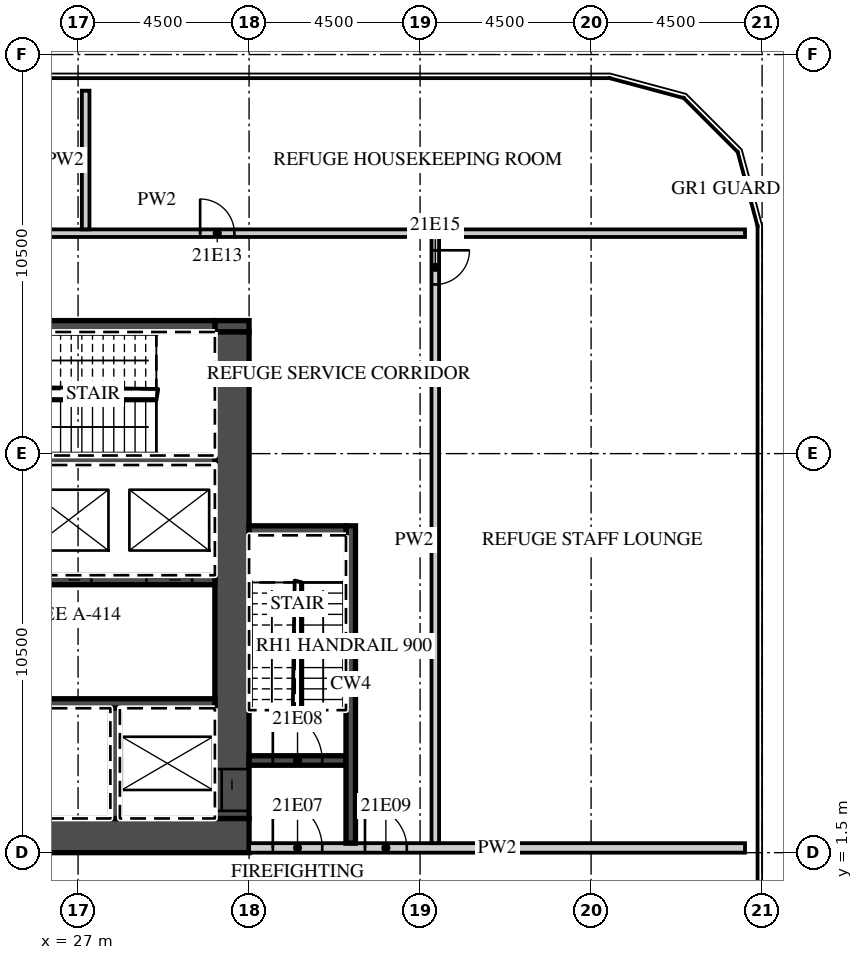
"""IFC4 building model, lengths in metres.
Left out: names, types, materials, properties, quantities, classifications, styles, units other than length and angle.
Written with IfcOpenShell. Run it as: python <this file> out.ifc"""

import sys

from ifc_helpers import new_model, si_unit, direction, frame, frame_2d, origin, place, context, subcontext, project, spatial, rectangle, extrude, element, fill, save


model = new_model("IFC4")
c1 = context("Model", 3, precision=1e-05, world=origin(), true_north=direction((0.0, 1.0)))
c2 = subcontext(c1, "Body", "Model", "MODEL_VIEW")
j1 = project(units=[si_unit("LENGTHUNIT", "METRE"), si_unit("PLANEANGLEUNIT", "RADIAN")], contexts=[c1])
p1 = place(None, origin())
s1 = spatial("IfcSite", under=j1, at=p1, CompositionType="ELEMENT")
p2 = place(p1, origin())
s2 = spatial("IfcBuilding", under=s1, at=p2, CompositionType="ELEMENT")
p3 = place(p2, frame((0.0, 0.0, 99.6)))
s3 = spatial("IfcBuildingStorey", under=s2, at=p3, CompositionType="ELEMENT", Elevation=99.6)
p4 = place(p3, frame((13.5, 1.95, 0.0), z_axis=(0.0, 0.0, 1.0), x_axis=(1.0, 0.0, 0.0)))
e1 = element("IfcWall", 1, at=p4, inside=s3, PredefinedType="SHEAR", context=c2, shape_type="SweptSolid", body=[
    extrude(rectangle(XDim=18.0, YDim=0.9, at=frame_2d((9.0, 0.0))), origin(), (0.0, 0.0, 1.0), 4.2),
])
p5 = place(p4, frame((1.475, 0.0, 0.0)))
e2 = element("IfcOpeningElement", 2, at=p5, cuts=e1, PredefinedType="OPENING", context=c2, shape_type="SweptSolid", body=[
    extrude(rectangle(XDim=1.8, YDim=2.1, at=frame_2d((0.9, 1.05))), frame((0.0, 0.46, 0.0), z_axis=(0.0, -1.0, 0.0), x_axis=(1.0, 0.0, 0.0)), (0.0, 0.0, 1.0), 0.92),
])
p6 = place(p3, frame((30.6, 15.35, 0.0), z_axis=(0.0, 0.0, 1.0), x_axis=(1.0, 0.0, 0.0)))
e3 = element("IfcWall", 3, at=p6, inside=s3, PredefinedType="SHEAR", context=c2, shape_type="SweptSolid", body=[
    extrude(rectangle(XDim=0.9, YDim=0.3, at=frame_2d((0.45, 0.0))), origin(), (0.0, 0.0, 1.0), 4.2),
])
p7 = place(p3, frame((20.3, 15.35, 0.0), z_axis=(0.0, 0.0, 1.0), x_axis=(1.0, 0.0, 0.0)))
e4 = element("IfcWall", 4, at=p7, inside=s3, PredefinedType="SHEAR", context=c2, shape_type="SweptSolid", body=[
    extrude(rectangle(XDim=10.3, YDim=0.3, at=frame_2d((5.15, 0.0))), origin(), (0.0, 0.0, 1.0), 4.2),
])
p8 = place(p7, frame((4.0, 0.0, 0.0)))
e5 = element("IfcOpeningElement", 5, at=p8, cuts=e4, PredefinedType="OPENING", context=c2, shape_type="SweptSolid", body=[
    extrude(rectangle(XDim=1.3, YDim=2.1, at=frame_2d((0.65, 1.05))), frame((0.0, 0.16, 0.0), z_axis=(0.0, -1.0, 0.0), x_axis=(1.0, 0.0, 0.0)), (0.0, 0.0, 1.0), 0.32),
])
p9 = place(p7, frame((1.5, 0.0, 0.0)))
e6 = element("IfcOpeningElement", 6, at=p9, cuts=e4, PredefinedType="OPENING", context=c2, shape_type="SweptSolid", body=[
    extrude(rectangle(XDim=0.9, YDim=2.1, at=frame_2d((0.45, 1.05))), frame((0.0, 0.16, 0.0), z_axis=(0.0, -1.0, 0.0), x_axis=(1.0, 0.0, 0.0)), (0.0, 0.0, 1.0), 0.32),
])
p10 = place(p3, frame((31.05, 2.4, 0.0), z_axis=(0.0, 0.0, 1.0), x_axis=(0.0, 1.0, 0.0)))
e7 = element("IfcWall", 7, at=p10, inside=s3, PredefinedType="SHEAR", context=c2, shape_type="SweptSolid", body=[
    extrude(rectangle(XDim=12.8, YDim=0.9, at=frame_2d((6.4, 0.0))), origin(), (0.0, 0.0, 1.0), 4.2),
])
p11 = place(p10, frame((0.2, 0.0, 0.0)))
e8 = element("IfcOpeningElement", 8, at=p11, cuts=e7, PredefinedType="OPENING", context=c2, shape_type="SweptSolid", body=[
    extrude(rectangle(XDim=1.1, YDim=2.1, at=frame_2d((0.55, 1.05))), frame((0.0, 0.46, 0.0), z_axis=(0.0, -1.0, 0.0), x_axis=(1.0, 0.0, 0.0)), (0.0, 0.0, 1.0), 0.92),
])
p12 = place(p3, frame((17.6, 5.425, 0.0), z_axis=(0.0, 0.0, 1.0), x_axis=(1.0, 0.0, 0.0)))
e9 = element("IfcWall", 9, at=p12, inside=s3, PredefinedType="SHEAR", context=c2, shape_type="SweptSolid", body=[
    extrude(rectangle(XDim=13.0, YDim=0.25, at=frame_2d((6.5, 0.0))), origin(), (0.0, 0.0, 1.0), 4.2),
])
p13 = place(p3, frame((27.975, 2.4, 0.0), z_axis=(0.0, 0.0, 1.0), x_axis=(0.0, 1.0, 0.0)))
e10 = element("IfcWall", 10, at=p13, inside=s3, PredefinedType="SHEAR", context=c2, shape_type="SweptSolid", body=[
    extrude(rectangle(XDim=2.9, YDim=0.25, at=frame_2d((1.45, 0.0))), origin(), (0.0, 0.0, 1.0), 4.2),
])
p14 = place(p3, frame((14.4, 8.675, 0.0), z_axis=(0.0, 0.0, 1.0), x_axis=(1.0, 0.0, 0.0)))
e11 = element("IfcWall", 11, at=p14, inside=s3, PredefinedType="SHEAR", context=c2, shape_type="SweptSolid", body=[
    extrude(rectangle(XDim=16.2, YDim=0.25, at=frame_2d((8.1, 0.0))), origin(), (0.0, 0.0, 1.0), 4.2),
])
p15 = place(p14, frame((14.4, 0.0, 0.0)))
e12 = element("IfcOpeningElement", 12, at=p15, cuts=e11, PredefinedType="OPENING", context=c2, shape_type="SweptSolid", body=[
    extrude(rectangle(XDim=1.2, YDim=2.1, at=frame_2d((0.6, 1.05))), frame((0.0, 0.135, 0.0), z_axis=(0.0, -1.0, 0.0), x_axis=(1.0, 0.0, 0.0)), (0.0, 0.0, 1.0), 0.27),
])
p16 = place(p14, frame((11.75, 0.0, 0.0)))
e13 = element("IfcOpeningElement", 13, at=p16, cuts=e11, PredefinedType="OPENING", context=c2, shape_type="SweptSolid", body=[
    extrude(rectangle(XDim=1.2, YDim=2.1, at=frame_2d((0.6, 1.05))), frame((0.0, 0.135, 0.0), z_axis=(0.0, -1.0, 0.0), x_axis=(1.0, 0.0, 0.0)), (0.0, 0.0, 1.0), 0.27),
])
p17 = place(p14, frame((9.1, 0.0, 0.0)))
e14 = element("IfcOpeningElement", 14, at=p17, cuts=e11, PredefinedType="OPENING", context=c2, shape_type="SweptSolid", body=[
    extrude(rectangle(XDim=1.2, YDim=2.1, at=frame_2d((0.6, 1.05))), frame((0.0, 0.135, 0.0), z_axis=(0.0, -1.0, 0.0), x_axis=(1.0, 0.0, 0.0)), (0.0, 0.0, 1.0), 0.27),
])
p18 = place(p14, frame((0.65, 0.0, 0.0)))
e15 = element("IfcOpeningElement", 15, at=p18, cuts=e11, PredefinedType="OPENING", context=c2, shape_type="SweptSolid", body=[
    extrude(rectangle(XDim=1.3, YDim=2.1, at=frame_2d((0.65, 1.05))), frame((0.0, 0.135, 0.0), z_axis=(0.0, -1.0, 0.0), x_axis=(1.0, 0.0, 0.0)), (0.0, 0.0, 1.0), 0.27),
])
p19 = place(p3, frame((17.35, 11.825, 0.0), z_axis=(0.0, 0.0, 1.0), x_axis=(1.0, 0.0, 0.0)))
e16 = element("IfcWall", 16, at=p19, inside=s3, PredefinedType="SHEAR", context=c2, shape_type="SweptSolid", body=[
    extrude(rectangle(XDim=13.25, YDim=0.25, at=frame_2d((6.625, 0.0))), origin(), (0.0, 0.0, 1.0), 4.2),
])
p20 = place(p3, frame((31.5, 1.625, 0.0), z_axis=(0.0, 0.0, 1.0), x_axis=(1.0, 0.0, 0.0)))
e17 = element("IfcWall", 17, at=p20, inside=s3, PredefinedType="PARTITIONING", context=c2, shape_type="SweptSolid", body=[
    extrude(rectangle(XDim=13.05, YDim=0.25, at=frame_2d((6.525, 0.0))), origin(), (0.0, 0.0, 1.0), 4.2),
])
p21 = place(p20, frame((0.625, 0.0, 0.0)))
e18 = element("IfcOpeningElement", 18, at=p21, cuts=e17, PredefinedType="OPENING", context=c2, shape_type="SweptSolid", body=[
    extrude(rectangle(XDim=1.3, YDim=2.1, at=frame_2d((0.65, 1.05))), frame((0.0, 0.135, 0.0), z_axis=(0.0, -1.0, 0.0), x_axis=(1.0, 0.0, 0.0)), (0.0, 0.0, 1.0), 0.27),
])
p22 = place(p20, frame((3.05, 0.0, 0.0)))
e19 = element("IfcOpeningElement", 19, at=p22, cuts=e17, PredefinedType="OPENING", context=c2, shape_type="SweptSolid", body=[
    extrude(rectangle(XDim=1.1, YDim=2.1, at=frame_2d((0.55, 1.05))), frame((0.0, 0.135, 0.0), z_axis=(0.0, -1.0, 0.0), x_axis=(1.0, 0.0, 0.0)), (0.0, 0.0, 1.0), 0.27),
])
p23 = place(p3, frame((31.5, 3.925, 0.0), z_axis=(0.0, 0.0, 1.0), x_axis=(1.0, 0.0, 0.0)))
e20 = element("IfcWall", 20, at=p23, inside=s3, PredefinedType="SHEAR", context=c2, shape_type="SweptSolid", body=[
    extrude(rectangle(XDim=2.55, YDim=0.25, at=frame_2d((1.275, 0.0))), origin(), (0.0, 0.0, 1.0), 4.2),
])
p24 = place(p23, frame((0.625, 0.0, 0.0)))
e21 = element("IfcOpeningElement", 21, at=p24, cuts=e20, PredefinedType="OPENING", context=c2, shape_type="SweptSolid", body=[
    extrude(rectangle(XDim=1.3, YDim=2.1, at=frame_2d((0.65, 1.05))), frame((0.0, 0.135, 0.0), z_axis=(0.0, -1.0, 0.0), x_axis=(1.0, 0.0, 0.0)), (0.0, 0.0, 1.0), 0.27),
])
p25 = place(p3, frame((34.175, 1.75, 0.0), z_axis=(0.0, 0.0, 1.0), x_axis=(0.0, 1.0, 0.0)))
e22 = element("IfcWall", 22, at=p25, inside=s3, PredefinedType="SHEAR", context=c2, shape_type="SweptSolid", body=[
    extrude(rectangle(XDim=8.35, YDim=0.25, at=frame_2d((4.175, 0.0))), origin(), (0.0, 0.0, 1.0), 4.2),
])
p26 = place(p3, frame((31.5, 9.975, 0.0), z_axis=(0.0, 0.0, 1.0), x_axis=(1.0, 0.0, 0.0)))
e23 = element("IfcWall", 23, at=p26, inside=s3, PredefinedType="SHEAR", context=c2, shape_type="SweptSolid", body=[
    extrude(rectangle(XDim=2.55, YDim=0.25, at=frame_2d((1.275, 0.0))), origin(), (0.0, 0.0, 1.0), 4.2),
])
p27 = place(p3, frame((36.4, 1.75, 0.0), z_axis=(0.0, 0.0, 1.0), x_axis=(0.0, 1.0, 0.0)))
e24 = element("IfcWall", 24, at=p27, inside=s3, PredefinedType="PARTITIONING", context=c2, shape_type="SweptSolid", body=[
    extrude(rectangle(XDim=15.95, YDim=0.2, at=frame_2d((7.975, 0.0))), origin(), (0.0, 0.0, 1.0), 4.2),
])
p28 = place(p27, frame((14.7, 0.0, 0.0)))
e25 = element("IfcOpeningElement", 25, at=p28, cuts=e24, PredefinedType="OPENING", context=c2, shape_type="SweptSolid", body=[
    extrude(rectangle(XDim=0.9, YDim=2.1, at=frame_2d((0.45, 1.05))), frame((0.0, 0.11, 0.0), z_axis=(0.0, -1.0, 0.0), x_axis=(1.0, 0.0, 0.0)), (0.0, 0.0, 1.0), 0.22),
])
p29 = place(p3, frame((13.6, 17.8, 0.0), z_axis=(0.0, 0.0, 1.0), x_axis=(1.0, 0.0, 0.0)))
e26 = element("IfcWall", 26, at=p29, inside=s3, PredefinedType="PARTITIONING", context=c2, shape_type="SweptSolid", body=[
    extrude(rectangle(XDim=30.95, YDim=0.2, at=frame_2d((15.475, 0.0))), origin(), (0.0, 0.0, 1.0), 4.2),
])
p30 = place(p29, frame((16.613, 0.0, 0.0)))
e27 = element("IfcOpeningElement", 27, at=p30, cuts=e26, PredefinedType="OPENING", context=c2, shape_type="SweptSolid", body=[
    extrude(rectangle(XDim=0.9, YDim=2.1, at=frame_2d((0.45, 1.05))), frame((0.0, 0.11, 0.0), z_axis=(0.0, -1.0, 0.0), x_axis=(1.0, 0.0, 0.0)), (0.0, 0.0, 1.0), 0.22),
])
p31 = place(p29, frame((8.312, 0.0, 0.0)))
e28 = element("IfcOpeningElement", 28, at=p31, cuts=e26, PredefinedType="OPENING", context=c2, shape_type="SweptSolid", body=[
    extrude(rectangle(XDim=0.9, YDim=2.1, at=frame_2d((0.45, 1.05))), frame((0.0, 0.11, 0.0), z_axis=(0.0, -1.0, 0.0), x_axis=(1.0, 0.0, 0.0)), (0.0, 0.0, 1.0), 0.22),
])
p32 = place(p3, frame((27.2, 17.9, 0.0), z_axis=(0.0, 0.0, 1.0), x_axis=(0.0, 1.0, 0.0)))
e29 = element("IfcWall", 29, at=p32, inside=s3, PredefinedType="PARTITIONING", context=c2, shape_type="SweptSolid", body=[
    extrude(rectangle(XDim=3.65, YDim=0.2, at=frame_2d((1.825, 0.0))), origin(), (0.0, 0.0, 1.0), 4.2),
])
p33 = place(p15, origin())
e30 = element("IfcDoor", 30, at=p33, inside=s3, OperationType="SLIDING_TO_LEFT", PredefinedType="DOOR", context=c2, shape_type="SweptSolid", body=[
    extrude(rectangle(XDim=1.2, YDim=2.1, at=frame_2d((0.6, 1.05))), frame((0.0, 0.025, 0.0), z_axis=(0.0, -1.0, 0.0), x_axis=(1.0, 0.0, 0.0)), (0.0, 0.0, 1.0), 0.05),
])
fill(e12, e30)
p34 = place(p16, origin())
e31 = element("IfcDoor", 31, at=p34, inside=s3, OperationType="SLIDING_TO_RIGHT", PredefinedType="DOOR", context=c2, shape_type="SweptSolid", body=[
    extrude(rectangle(XDim=1.2, YDim=2.1, at=frame_2d((0.6, 1.05))), frame((0.0, 0.025, 0.0), z_axis=(0.0, -1.0, 0.0), x_axis=(1.0, 0.0, 0.0)), (0.0, 0.0, 1.0), 0.05),
])
fill(e13, e31)
p35 = place(p11, origin())
e32 = element("IfcDoor", 32, at=p35, inside=s3, OperationType="SLIDING_TO_LEFT", PredefinedType="DOOR", context=c2, shape_type="SweptSolid", body=[
    extrude(rectangle(XDim=1.1, YDim=2.1, at=frame_2d((0.55, 1.05))), frame((0.0, 0.025, 0.0), z_axis=(0.0, -1.0, 0.0), x_axis=(1.0, 0.0, 0.0)), (0.0, 0.0, 1.0), 0.05),
])
fill(e8, e32)
p36 = place(p21, origin())
e33 = element("IfcDoor", 33, at=p36, inside=s3, OperationType="SINGLE_SWING_LEFT", PredefinedType="DOOR", context=c2, shape_type="SweptSolid", body=[
    extrude(rectangle(XDim=1.3, YDim=2.1, at=frame_2d((0.65, 1.05))), frame((0.0, 0.025, 0.0), z_axis=(0.0, -1.0, 0.0), x_axis=(1.0, 0.0, 0.0)), (0.0, 0.0, 1.0), 0.05),
])
fill(e18, e33)
p37 = place(p24, origin())
e34 = element("IfcDoor", 34, at=p37, inside=s3, OperationType="SINGLE_SWING_LEFT", PredefinedType="DOOR", context=c2, shape_type="SweptSolid", body=[
    extrude(rectangle(XDim=1.3, YDim=2.1, at=frame_2d((0.65, 1.05))), frame((0.0, 0.025, 0.0), z_axis=(0.0, -1.0, 0.0), x_axis=(1.0, 0.0, 0.0)), (0.0, 0.0, 1.0), 0.05),
])
fill(e21, e34)
p38 = place(p22, origin())
e35 = element("IfcDoor", 35, at=p38, inside=s3, OperationType="SINGLE_SWING_LEFT", PredefinedType="DOOR", context=c2, shape_type="SweptSolid", body=[
    extrude(rectangle(XDim=1.1, YDim=2.1, at=frame_2d((0.55, 1.05))), frame((0.0, 0.025, 0.0), z_axis=(0.0, -1.0, 0.0), x_axis=(1.0, 0.0, 0.0)), (0.0, 0.0, 1.0), 0.05),
])
fill(e19, e35)
p39 = place(p30, origin())
e36 = element("IfcDoor", 36, at=p39, inside=s3, OperationType="SINGLE_SWING_LEFT", PredefinedType="DOOR", context=c2, shape_type="SweptSolid", body=[
    extrude(rectangle(XDim=0.9, YDim=2.1, at=frame_2d((0.45, 1.05))), frame((0.0, 0.025, 0.0), z_axis=(0.0, -1.0, 0.0), x_axis=(1.0, 0.0, 0.0)), (0.0, 0.0, 1.0), 0.05),
])
fill(e27, e36)
p40 = place(p28, origin())
e37 = element("IfcDoor", 37, at=p40, inside=s3, OperationType="SINGLE_SWING_RIGHT", PredefinedType="DOOR", context=c2, shape_type="SweptSolid", body=[
    extrude(rectangle(XDim=0.9, YDim=2.1, at=frame_2d((0.45, 1.05))), frame((0.0, 0.025, 0.0), z_axis=(0.0, -1.0, 0.0), x_axis=(1.0, 0.0, 0.0)), (0.0, 0.0, 1.0), 0.05),
])
fill(e25, e37)
save(model, sys.argv[1])
